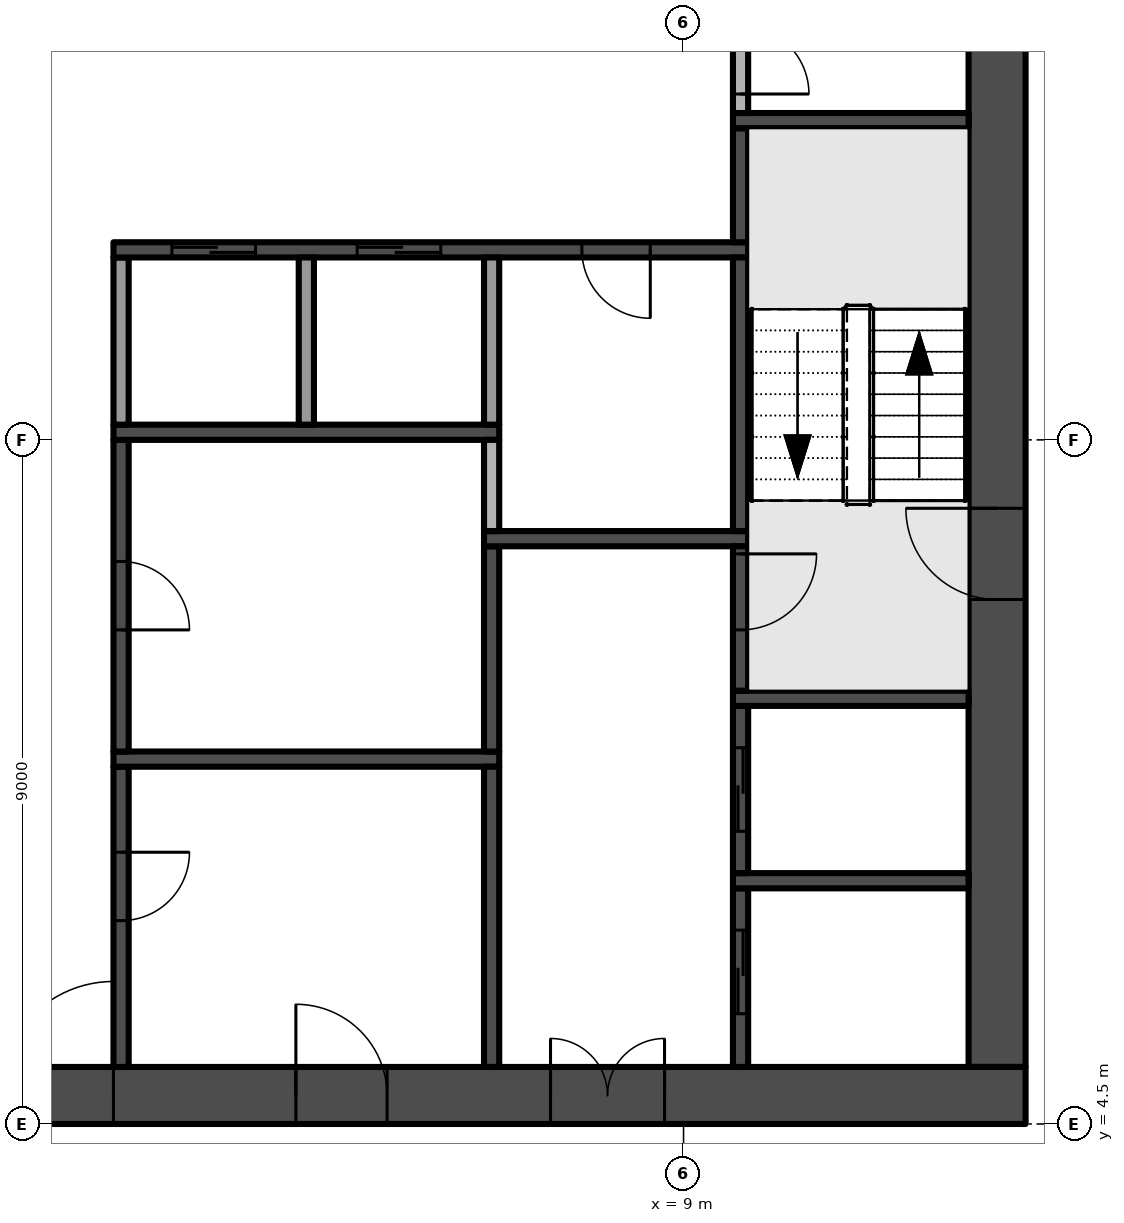
"""IFC4 building model, lengths in metres.
Left out: names, types, materials, properties, quantities, classifications, styles, units other than length and angle.
Written with IfcOpenShell. Run it as: python <this file> out.ifc"""

import sys

from ifc_helpers import new_model, si_unit, direction, frame, frame_2d, origin, place, context, subcontext, project, spatial, rectangle, extrude, element, fill, save


model = new_model("IFC4")
c1 = context("Model", 3, precision=1e-05, world=origin(), true_north=direction((0.0, 1.0)))
c2 = subcontext(c1, "Body", "Model", "MODEL_VIEW")
j1 = project(units=[si_unit("LENGTHUNIT", "METRE"), si_unit("PLANEANGLEUNIT", "RADIAN")], contexts=[c1])
p1 = place(None, origin())
s1 = spatial("IfcSite", under=j1, at=p1, CompositionType="ELEMENT")
p2 = place(p1, origin())
s2 = spatial("IfcBuilding", under=s1, at=p2, CompositionType="ELEMENT")
p3 = place(p2, frame((0.0, 0.0, 120.0)))
s3 = spatial("IfcBuildingStorey", under=s2, at=p3, CompositionType="ELEMENT", Elevation=120.0)
p4 = place(p3, frame((-13.5, 4.875, -0.3), z_axis=(0.0, 0.0, 1.0), x_axis=(1.0, 0.0, 0.0)))
e1 = element("IfcWall", 1, at=p4, inside=s3, PredefinedType="SHEAR", context=c2, shape_type="SweptSolid", body=[
    extrude(rectangle(XDim=27.0, YDim=0.75, at=frame_2d((13.5, 0.0))), origin(), (0.0, 0.0, 1.0), 5.0),
])
p5 = place(p4, frame((12.0, 0.0, 0.3)))
e2 = element("IfcOpeningElement", 2, at=p5, cuts=e1, PredefinedType="OPENING", context=c2, shape_type="SweptSolid", body=[
    extrude(rectangle(XDim=3.0, YDim=2.4, at=frame_2d((1.5, 1.2))), frame((0.0, 0.385, 0.0), z_axis=(0.0, -1.0, 0.0), x_axis=(1.0, 0.0, 0.0)), (0.0, 0.0, 1.0), 0.77),
])
p6 = place(p4, frame((4.9, 0.0, 0.3)))
e3 = element("IfcOpeningElement", 3, at=p6, cuts=e1, PredefinedType="OPENING", context=c2, shape_type="SweptSolid", body=[
    extrude(rectangle(XDim=1.2, YDim=2.2, at=frame_2d((0.6, 1.1))), frame((0.0, 0.385, 0.0), z_axis=(0.0, -1.0, 0.0), x_axis=(1.0, 0.0, 0.0)), (0.0, 0.0, 1.0), 0.77),
])
p7 = place(p4, frame((20.75, 0.0, 0.3)))
e4 = element("IfcOpeningElement", 4, at=p7, cuts=e1, PredefinedType="OPENING", context=c2, shape_type="SweptSolid", body=[
    extrude(rectangle(XDim=1.5, YDim=2.2, at=frame_2d((0.75, 1.1))), frame((0.0, 0.385, 0.0), z_axis=(0.0, -1.0, 0.0), x_axis=(1.0, 0.0, 0.0)), (0.0, 0.0, 1.0), 0.77),
])
p8 = place(p4, frame((17.4, 0.0, 0.3)))
e5 = element("IfcOpeningElement", 5, at=p8, cuts=e1, PredefinedType="OPENING", context=c2, shape_type="SweptSolid", body=[
    extrude(rectangle(XDim=1.2, YDim=2.2, at=frame_2d((0.6, 1.1))), frame((0.0, 0.385, 0.0), z_axis=(0.0, -1.0, 0.0), x_axis=(1.0, 0.0, 0.0)), (0.0, 0.0, 1.0), 0.77),
])
p9 = place(p3, frame((13.125, 5.25, -0.3), z_axis=(0.0, 0.0, 1.0), x_axis=(0.0, 1.0, 0.0)))
e6 = element("IfcWall", 6, at=p9, inside=s3, PredefinedType="SHEAR", context=c2, shape_type="SweptSolid", body=[
    extrude(rectangle(XDim=16.5, YDim=0.75, at=frame_2d((8.25, 0.0))), origin(), (0.0, 0.0, 1.0), 5.0),
])
p10 = place(p9, frame((6.15, 0.0, 0.3)))
e7 = element("IfcOpeningElement", 7, at=p10, cuts=e6, PredefinedType="OPENING", context=c2, shape_type="SweptSolid", body=[
    extrude(rectangle(XDim=1.2, YDim=2.2, at=frame_2d((0.6, 1.1))), frame((0.0, 0.385, 0.0), z_axis=(0.0, -1.0, 0.0), x_axis=(1.0, 0.0, 0.0)), (0.0, 0.0, 1.0), 0.77),
])
p11 = place(p3, frame((1.6, 9.2, 0.0), z_axis=(0.0, 0.0, 1.0), x_axis=(0.0, -1.0, 0.0)))
e8 = element("IfcWall", 8, at=p11, inside=s3, PredefinedType="SHEAR", context=c2, shape_type="SweptSolid", body=[
    extrude(rectangle(XDim=3.95, YDim=0.2, at=frame_2d((1.975, 0.0))), origin(), (0.0, 0.0, 1.0), 4.7),
])
p12 = place(p11, frame((1.125, 0.0, 0.0)))
e9 = element("IfcOpeningElement", 9, at=p12, cuts=e8, PredefinedType="OPENING", context=c2, shape_type="SweptSolid", body=[
    extrude(rectangle(XDim=0.9, YDim=2.1, at=frame_2d((0.45, 1.05))), frame((0.0, 0.11, 0.0), z_axis=(0.0, -1.0, 0.0), x_axis=(1.0, 0.0, 0.0)), (0.0, 0.0, 1.0), 0.22),
])
p13 = place(p3, frame((1.5, 9.3, 0.0), z_axis=(0.0, 0.0, 1.0), x_axis=(1.0, 0.0, 0.0)))
e10 = element("IfcWall", 10, at=p13, inside=s3, PredefinedType="SHEAR", context=c2, shape_type="SweptSolid", body=[
    extrude(rectangle(XDim=5.075, YDim=0.2, at=frame_2d((2.538, 0.0))), origin(), (0.0, 0.0, 1.0), 4.7),
])
p14 = place(p3, frame((1.6, 13.5, 0.0), z_axis=(0.0, 0.0, 1.0), x_axis=(0.0, -1.0, 0.0)))
e11 = element("IfcWall", 11, at=p14, inside=s3, PredefinedType="SHEAR", context=c2, shape_type="SweptSolid", body=[
    extrude(rectangle(XDim=4.1, YDim=0.2, at=frame_2d((2.05, 0.0))), origin(), (0.0, 0.0, 1.0), 4.7),
])
p15 = place(p14, frame((1.6, 0.0, 0.0)))
e12 = element("IfcOpeningElement", 12, at=p15, cuts=e11, PredefinedType="OPENING", context=c2, shape_type="SweptSolid", body=[
    extrude(rectangle(XDim=0.9, YDim=2.1, at=frame_2d((0.45, 1.05))), frame((0.0, 0.11, 0.0), z_axis=(0.0, -1.0, 0.0), x_axis=(1.0, 0.0, 0.0)), (0.0, 0.0, 1.0), 0.22),
])
p16 = place(p3, frame((1.5, 13.6, 0.0), z_axis=(0.0, 0.0, 1.0), x_axis=(1.0, 0.0, 0.0)))
e13 = element("IfcWall", 13, at=p16, inside=s3, PredefinedType="SHEAR", context=c2, shape_type="SweptSolid", body=[
    extrude(rectangle(XDim=5.075, YDim=0.2, at=frame_2d((2.538, 0.0))), origin(), (0.0, 0.0, 1.0), 4.7),
])
p17 = place(p3, frame((1.6, 13.7, 0.0), z_axis=(0.0, 0.0, 1.0), x_axis=(0.0, 1.0, 0.0)))
e14 = element("IfcWall", 14, at=p17, inside=s3, PredefinedType="PARTITIONING", context=c2, shape_type="SweptSolid", body=[
    extrude(rectangle(XDim=2.2, YDim=0.2, at=frame_2d((1.1, 0.0))), origin(), (0.0, 0.0, 1.0), 4.7),
])
p18 = place(p3, frame((9.85, 16.0, 0.0), z_axis=(0.0, 0.0, 1.0), x_axis=(-1.0, 0.0, 0.0)))
e15 = element("IfcWall", 15, at=p18, inside=s3, PredefinedType="SHEAR", context=c2, shape_type="SweptSolid", body=[
    extrude(rectangle(XDim=8.35, YDim=0.2, at=frame_2d((4.175, 0.0))), origin(), (0.0, 0.0, 1.0), 4.7),
])
p19 = place(p18, frame((6.481, 0.0, 0.0)))
e16 = element("IfcOpeningElement", 16, at=p19, cuts=e15, PredefinedType="OPENING", context=c2, shape_type="SweptSolid", body=[
    extrude(rectangle(XDim=1.1, YDim=2.1, at=frame_2d((0.55, 1.05))), frame((0.0, 0.11, 0.0), z_axis=(0.0, -1.0, 0.0), x_axis=(1.0, 0.0, 0.0)), (0.0, 0.0, 1.0), 0.22),
])
p20 = place(p18, frame((4.044, 0.0, 0.0)))
e17 = element("IfcOpeningElement", 17, at=p20, cuts=e15, PredefinedType="OPENING", context=c2, shape_type="SweptSolid", body=[
    extrude(rectangle(XDim=1.1, YDim=2.1, at=frame_2d((0.55, 1.05))), frame((0.0, 0.11, 0.0), z_axis=(0.0, -1.0, 0.0), x_axis=(1.0, 0.0, 0.0)), (0.0, 0.0, 1.0), 0.22),
])
p21 = place(p18, frame((1.288, 0.0, 0.0)))
e18 = element("IfcOpeningElement", 18, at=p21, cuts=e15, PredefinedType="OPENING", context=c2, shape_type="SweptSolid", body=[
    extrude(rectangle(XDim=0.9, YDim=2.1, at=frame_2d((0.45, 1.05))), frame((0.0, 0.11, 0.0), z_axis=(0.0, -1.0, 0.0), x_axis=(1.0, 0.0, 0.0)), (0.0, 0.0, 1.0), 0.22),
])
p22 = place(p3, frame((4.037, 13.7, 0.0), z_axis=(0.0, 0.0, 1.0), x_axis=(0.0, 1.0, 0.0)))
e19 = element("IfcWall", 19, at=p22, inside=s3, PredefinedType="PARTITIONING", context=c2, shape_type="SweptSolid", body=[
    extrude(rectangle(XDim=2.2, YDim=0.2, at=frame_2d((1.1, 0.0))), origin(), (0.0, 0.0, 1.0), 4.7),
])
p23 = place(p3, frame((6.475, 5.25, 0.0), z_axis=(0.0, 0.0, 1.0), x_axis=(0.0, 1.0, 0.0)))
e20 = element("IfcWall", 20, at=p23, inside=s3, PredefinedType="SHEAR", context=c2, shape_type="SweptSolid", body=[
    extrude(rectangle(XDim=3.95, YDim=0.2, at=frame_2d((1.975, 0.0))), origin(), (0.0, 0.0, 1.0), 4.7),
])
p24 = place(p3, frame((6.475, 9.4, 0.0), z_axis=(0.0, 0.0, 1.0), x_axis=(0.0, 1.0, 0.0)))
e21 = element("IfcWall", 21, at=p24, inside=s3, PredefinedType="SHEAR", context=c2, shape_type="SweptSolid", body=[
    extrude(rectangle(XDim=2.7, YDim=0.2, at=frame_2d((1.35, 0.0))), origin(), (0.0, 0.0, 1.0), 4.7),
])
p25 = place(p3, frame((6.375, 12.2, 0.0), z_axis=(0.0, 0.0, 1.0), x_axis=(1.0, 0.0, 0.0)))
e22 = element("IfcWall", 22, at=p25, inside=s3, PredefinedType="SHEAR", context=c2, shape_type="SweptSolid", body=[
    extrude(rectangle(XDim=3.475, YDim=0.2, at=frame_2d((1.738, 0.0))), origin(), (0.0, 0.0, 1.0), 4.7),
])
p26 = place(p3, frame((6.475, 12.3, 0.0), z_axis=(0.0, 0.0, 1.0), x_axis=(0.0, 1.0, 0.0)))
e23 = element("IfcWall", 23, at=p26, inside=s3, PredefinedType="PARTITIONING", context=c2, shape_type="SweptSolid", body=[
    extrude(rectangle(XDim=1.2, YDim=0.2, at=frame_2d((0.6, 0.0))), origin(), (0.0, 0.0, 1.0), 4.7),
])
p27 = place(p3, frame((6.475, 13.7, 0.0), z_axis=(0.0, 0.0, 1.0), x_axis=(0.0, 1.0, 0.0)))
e24 = element("IfcWall", 24, at=p27, inside=s3, PredefinedType="PARTITIONING", context=c2, shape_type="SweptSolid", body=[
    extrude(rectangle(XDim=2.2, YDim=0.2, at=frame_2d((1.1, 0.0))), origin(), (0.0, 0.0, 1.0), 4.7),
])
p28 = place(p3, frame((9.75, 5.25, 0.0), z_axis=(0.0, 0.0, 1.0), x_axis=(0.0, 1.0, 0.0)))
e25 = element("IfcWall", 25, at=p28, inside=s3, PredefinedType="SHEAR", context=c2, shape_type="SweptSolid", body=[
    extrude(rectangle(XDim=2.35, YDim=0.2, at=frame_2d((1.175, 0.0))), origin(), (0.0, 0.0, 1.0), 4.7),
])
p29 = place(p28, frame((0.7, 0.0, 0.0)))
e26 = element("IfcOpeningElement", 26, at=p29, cuts=e25, PredefinedType="OPENING", context=c2, shape_type="SweptSolid", body=[
    extrude(rectangle(XDim=1.1, YDim=2.1, at=frame_2d((0.55, 1.05))), frame((0.0, 0.11, 0.0), z_axis=(0.0, -1.0, 0.0), x_axis=(1.0, 0.0, 0.0)), (0.0, 0.0, 1.0), 0.22),
])
p30 = place(p3, frame((9.65, 7.7, 0.0), z_axis=(0.0, 0.0, 1.0), x_axis=(1.0, 0.0, 0.0)))
e27 = element("IfcWall", 27, at=p30, inside=s3, PredefinedType="SHEAR", context=c2, shape_type="SweptSolid", body=[
    extrude(rectangle(XDim=3.1, YDim=0.2, at=frame_2d((1.55, 0.0))), origin(), (0.0, 0.0, 1.0), 4.7),
])
p31 = place(p3, frame((9.75, 7.8, 0.0), z_axis=(0.0, 0.0, 1.0), x_axis=(0.0, 1.0, 0.0)))
e28 = element("IfcWall", 28, at=p31, inside=s3, PredefinedType="SHEAR", context=c2, shape_type="SweptSolid", body=[
    extrude(rectangle(XDim=2.2, YDim=0.2, at=frame_2d((1.1, 0.0))), origin(), (0.0, 0.0, 1.0), 4.7),
])
p32 = place(p31, frame((0.55, 0.0, 0.0)))
e29 = element("IfcOpeningElement", 29, at=p32, cuts=e28, PredefinedType="OPENING", context=c2, shape_type="SweptSolid", body=[
    extrude(rectangle(XDim=1.1, YDim=2.1, at=frame_2d((0.55, 1.05))), frame((0.0, 0.11, 0.0), z_axis=(0.0, -1.0, 0.0), x_axis=(1.0, 0.0, 0.0)), (0.0, 0.0, 1.0), 0.22),
])
p33 = place(p3, frame((9.65, 10.1, 0.0), z_axis=(0.0, 0.0, 1.0), x_axis=(1.0, 0.0, 0.0)))
e30 = element("IfcWall", 30, at=p33, inside=s3, PredefinedType="SHEAR", context=c2, shape_type="SweptSolid", body=[
    extrude(rectangle(XDim=3.1, YDim=0.2, at=frame_2d((1.55, 0.0))), origin(), (0.0, 0.0, 1.0), 4.7),
])
p34 = place(p3, frame((9.75, 12.1, 0.0), z_axis=(0.0, 0.0, 1.0), x_axis=(0.0, -1.0, 0.0)))
e31 = element("IfcWall", 31, at=p34, inside=s3, PredefinedType="SHEAR", context=c2, shape_type="SweptSolid", body=[
    extrude(rectangle(XDim=1.9, YDim=0.2, at=frame_2d((0.95, 0.0))), origin(), (0.0, 0.0, 1.0), 4.7),
])
p35 = place(p34, frame((0.1, 0.0, 0.0)))
e32 = element("IfcOpeningElement", 32, at=p35, cuts=e31, PredefinedType="OPENING", context=c2, shape_type="SweptSolid", body=[
    extrude(rectangle(XDim=1.0, YDim=2.2, at=frame_2d((0.5, 1.1))), frame((0.0, 0.11, 0.0), z_axis=(0.0, -1.0, 0.0), x_axis=(1.0, 0.0, 0.0)), (0.0, 0.0, 1.0), 0.22),
])
p36 = place(p3, frame((9.75, 12.3, 0.0), z_axis=(0.0, 0.0, 1.0), x_axis=(0.0, 1.0, 0.0)))
e33 = element("IfcWall", 33, at=p36, inside=s3, PredefinedType="SHEAR", context=c2, shape_type="SweptSolid", body=[
    extrude(rectangle(XDim=3.6, YDim=0.2, at=frame_2d((1.8, 0.0))), origin(), (0.0, 0.0, 1.0), 4.7),
])
p37 = place(p3, frame((9.75, 16.1, 0.0), z_axis=(0.0, 0.0, 1.0), x_axis=(0.0, 1.0, 0.0)))
e34 = element("IfcWall", 34, at=p37, inside=s3, PredefinedType="SHEAR", context=c2, shape_type="SweptSolid", body=[
    extrude(rectangle(XDim=1.5, YDim=0.2, at=frame_2d((0.75, 0.0))), origin(), (0.0, 0.0, 1.0), 4.7),
])
p38 = place(p3, frame((9.65, 17.7, 0.0), z_axis=(0.0, 0.0, 1.0), x_axis=(1.0, 0.0, 0.0)))
e35 = element("IfcWall", 35, at=p38, inside=s3, PredefinedType="SHEAR", context=c2, shape_type="SweptSolid", body=[
    extrude(rectangle(XDim=3.1, YDim=0.2, at=frame_2d((1.55, 0.0))), origin(), (0.0, 0.0, 1.0), 4.7),
])
p39 = place(p3, frame((9.75, 19.2, 0.0), z_axis=(0.0, 0.0, 1.0), x_axis=(0.0, -1.0, 0.0)))
e36 = element("IfcWall", 36, at=p39, inside=s3, PredefinedType="PARTITIONING", context=c2, shape_type="SweptSolid", body=[
    extrude(rectangle(XDim=1.4, YDim=0.2, at=frame_2d((0.7, 0.0))), origin(), (0.0, 0.0, 1.0), 4.7),
])
p40 = place(p39, frame((0.25, 0.0, 0.0)))
e37 = element("IfcOpeningElement", 37, at=p40, cuts=e36, PredefinedType="OPENING", context=c2, shape_type="SweptSolid", body=[
    extrude(rectangle(XDim=0.9, YDim=2.1, at=frame_2d((0.45, 1.05))), frame((0.0, 0.11, 0.0), z_axis=(0.0, -1.0, 0.0), x_axis=(1.0, 0.0, 0.0)), (0.0, 0.0, 1.0), 0.22),
])
p41 = place(p5, frame((3.0, 0.0, 0.0), z_axis=(0.0, 0.0, 1.0), x_axis=(-1.0, 0.0, 0.0)))
e38 = element("IfcDoor", 38, at=p41, inside=s3, OperationType="DOUBLE_DOOR_SINGLE_SWING", PredefinedType="DOOR", context=c2, shape_type="SweptSolid", body=[
    extrude(rectangle(XDim=3.0, YDim=2.4, at=frame_2d((1.5, 1.2))), frame((0.0, 0.025, 0.0), z_axis=(0.0, -1.0, 0.0), x_axis=(1.0, 0.0, 0.0)), (0.0, 0.0, 1.0), 0.05),
])
fill(e2, e38)
p42 = place(p10, frame((1.2, 0.0, 0.0), z_axis=(0.0, 0.0, 1.0), x_axis=(-1.0, 0.0, 0.0)))
e39 = element("IfcDoor", 39, at=p42, inside=s3, OperationType="SINGLE_SWING_LEFT", PredefinedType="DOOR", context=c2, shape_type="SweptSolid", body=[
    extrude(rectangle(XDim=1.2, YDim=2.2, at=frame_2d((0.6, 1.1))), frame((0.0, 0.025, 0.0), z_axis=(0.0, -1.0, 0.0), x_axis=(1.0, 0.0, 0.0)), (0.0, 0.0, 1.0), 0.05),
])
fill(e7, e39)
p43 = place(p7, frame((1.5, 0.0, 0.0), z_axis=(0.0, 0.0, 1.0), x_axis=(-1.0, 0.0, 0.0)))
e40 = element("IfcDoor", 40, at=p43, inside=s3, OperationType="DOUBLE_DOOR_SINGLE_SWING", PredefinedType="DOOR", context=c2, shape_type="SweptSolid", body=[
    extrude(rectangle(XDim=1.5, YDim=2.2, at=frame_2d((0.75, 1.1))), frame((0.0, 0.025, 0.0), z_axis=(0.0, -1.0, 0.0), x_axis=(1.0, 0.0, 0.0)), (0.0, 0.0, 1.0), 0.05),
])
fill(e4, e40)
p44 = place(p8, frame((1.2, 0.0, 0.0), z_axis=(0.0, 0.0, 1.0), x_axis=(-1.0, 0.0, 0.0)))
e41 = element("IfcDoor", 41, at=p44, inside=s3, OperationType="SINGLE_SWING_RIGHT", PredefinedType="DOOR", context=c2, shape_type="SweptSolid", body=[
    extrude(rectangle(XDim=1.2, YDim=2.2, at=frame_2d((0.6, 1.1))), frame((0.0, 0.025, 0.0), z_axis=(0.0, -1.0, 0.0), x_axis=(1.0, 0.0, 0.0)), (0.0, 0.0, 1.0), 0.05),
])
fill(e5, e41)
p45 = place(p35, origin())
e42 = element("IfcDoor", 42, at=p45, inside=s3, OperationType="SINGLE_SWING_LEFT", PredefinedType="DOOR", context=c2, shape_type="SweptSolid", body=[
    extrude(rectangle(XDim=1.0, YDim=2.2, at=frame_2d((0.5, 1.1))), frame((0.0, 0.025, 0.0), z_axis=(0.0, -1.0, 0.0), x_axis=(1.0, 0.0, 0.0)), (0.0, 0.0, 1.0), 0.05),
])
fill(e32, e42)
p46 = place(p19, origin())
e43 = element("IfcDoor", 43, at=p46, inside=s3, OperationType="SLIDING_TO_RIGHT", PredefinedType="DOOR", context=c2, shape_type="SweptSolid", body=[
    extrude(rectangle(XDim=1.1, YDim=2.1, at=frame_2d((0.55, 1.05))), frame((0.0, 0.025, 0.0), z_axis=(0.0, -1.0, 0.0), x_axis=(1.0, 0.0, 0.0)), (0.0, 0.0, 1.0), 0.05),
])
fill(e16, e43)
p47 = place(p20, origin())
e44 = element("IfcDoor", 44, at=p47, inside=s3, OperationType="SLIDING_TO_RIGHT", PredefinedType="DOOR", context=c2, shape_type="SweptSolid", body=[
    extrude(rectangle(XDim=1.1, YDim=2.1, at=frame_2d((0.55, 1.05))), frame((0.0, 0.025, 0.0), z_axis=(0.0, -1.0, 0.0), x_axis=(1.0, 0.0, 0.0)), (0.0, 0.0, 1.0), 0.05),
])
fill(e17, e44)
p48 = place(p29, origin())
e45 = element("IfcDoor", 45, at=p48, inside=s3, OperationType="SLIDING_TO_RIGHT", PredefinedType="DOOR", context=c2, shape_type="SweptSolid", body=[
    extrude(rectangle(XDim=1.1, YDim=2.1, at=frame_2d((0.55, 1.05))), frame((0.0, 0.025, 0.0), z_axis=(0.0, -1.0, 0.0), x_axis=(1.0, 0.0, 0.0)), (0.0, 0.0, 1.0), 0.05),
])
fill(e26, e45)
p49 = place(p32, origin())
e46 = element("IfcDoor", 46, at=p49, inside=s3, OperationType="SLIDING_TO_RIGHT", PredefinedType="DOOR", context=c2, shape_type="SweptSolid", body=[
    extrude(rectangle(XDim=1.1, YDim=2.1, at=frame_2d((0.55, 1.05))), frame((0.0, 0.025, 0.0), z_axis=(0.0, -1.0, 0.0), x_axis=(1.0, 0.0, 0.0)), (0.0, 0.0, 1.0), 0.05),
])
fill(e29, e46)
p50 = place(p12, origin())
e47 = element("IfcDoor", 47, at=p50, inside=s3, OperationType="SINGLE_SWING_LEFT", PredefinedType="DOOR", context=c2, shape_type="SweptSolid", body=[
    extrude(rectangle(XDim=0.9, YDim=2.1, at=frame_2d((0.45, 1.05))), frame((0.0, 0.025, 0.0), z_axis=(0.0, -1.0, 0.0), x_axis=(1.0, 0.0, 0.0)), (0.0, 0.0, 1.0), 0.05),
])
fill(e9, e47)
p51 = place(p15, origin())
e48 = element("IfcDoor", 48, at=p51, inside=s3, OperationType="SINGLE_SWING_RIGHT", PredefinedType="DOOR", context=c2, shape_type="SweptSolid", body=[
    extrude(rectangle(XDim=0.9, YDim=2.1, at=frame_2d((0.45, 1.05))), frame((0.0, 0.025, 0.0), z_axis=(0.0, -1.0, 0.0), x_axis=(1.0, 0.0, 0.0)), (0.0, 0.0, 1.0), 0.05),
])
fill(e12, e48)
p52 = place(p21, origin())
e49 = element("IfcDoor", 49, at=p52, inside=s3, OperationType="SINGLE_SWING_LEFT", PredefinedType="DOOR", context=c2, shape_type="SweptSolid", body=[
    extrude(rectangle(XDim=0.9, YDim=2.1, at=frame_2d((0.45, 1.05))), frame((0.0, 0.025, 0.0), z_axis=(0.0, -1.0, 0.0), x_axis=(1.0, 0.0, 0.0)), (0.0, 0.0, 1.0), 0.05),
])
fill(e18, e49)
p53 = place(p40, origin())
e50 = element("IfcDoor", 50, at=p53, inside=s3, OperationType="SINGLE_SWING_RIGHT", PredefinedType="DOOR", context=c2, shape_type="SweptSolid", body=[
    extrude(rectangle(XDim=0.9, YDim=2.1, at=frame_2d((0.45, 1.05))), frame((0.0, 0.025, 0.0), z_axis=(0.0, -1.0, 0.0), x_axis=(1.0, 0.0, 0.0)), (0.0, 0.0, 1.0), 0.05),
])
fill(e37, e50)
save(model, sys.argv[1])
